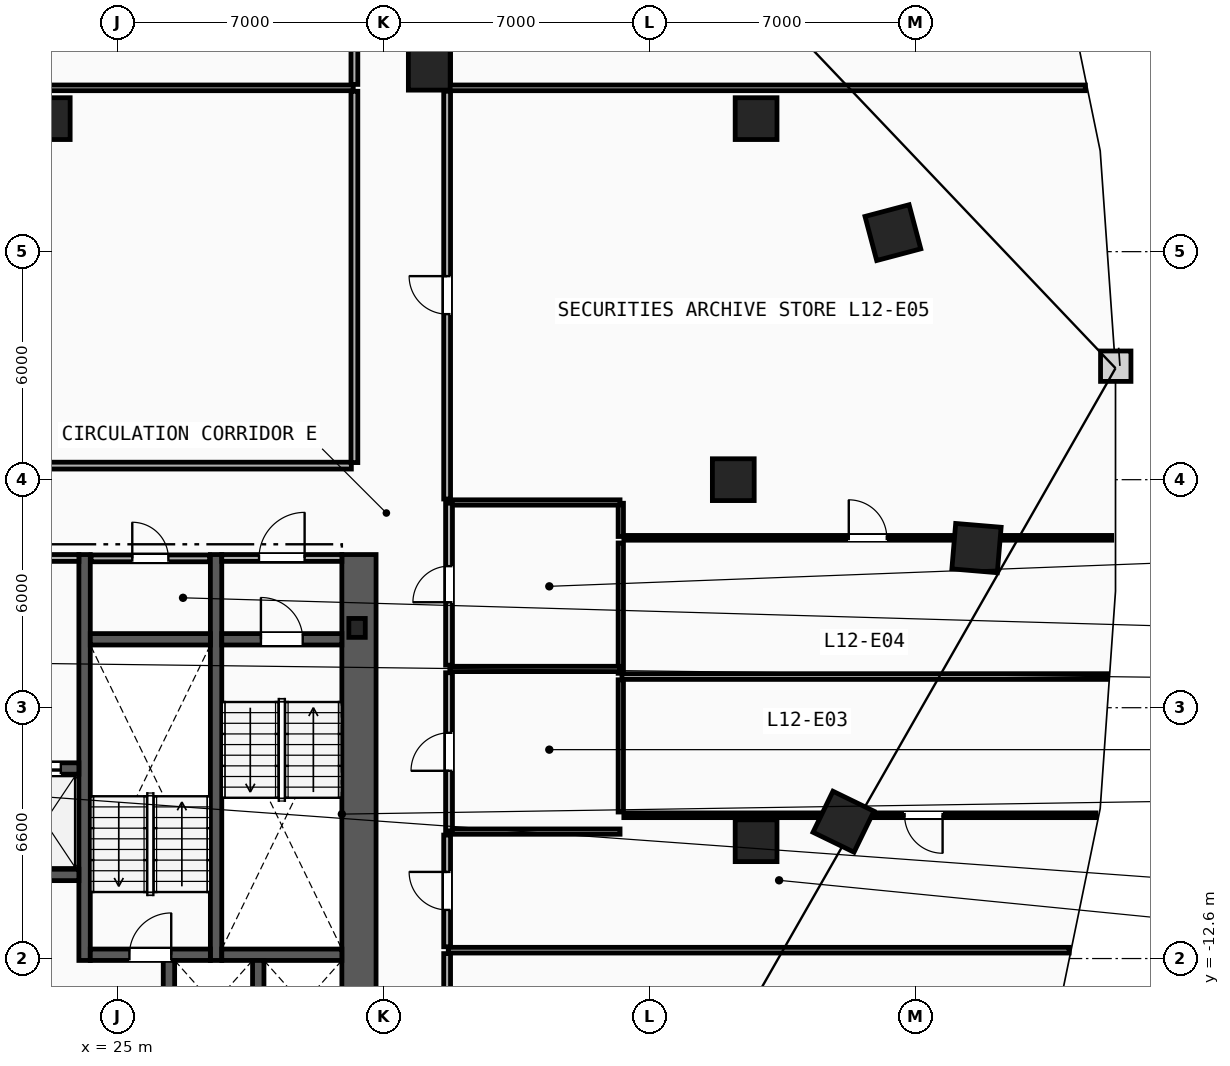
"""IFC4 building model, lengths in metres.
Left out: names, types, materials, properties, quantities, classifications, styles, units other than length and angle.
Written with IfcOpenShell. Run it as: python <this file> out.ifc"""

import sys

from ifc_helpers import new_model, si_unit, direction, frame, frame_2d, origin, origin_2d, place, context, subcontext, project, spatial, rectangle, i_section, extrude, element, fill, save


model = new_model("IFC4")
c1 = context("Model", 3, precision=1e-05, world=origin(), true_north=direction((0.0, 1.0)))
c2 = subcontext(c1, "Body", "Model", "MODEL_VIEW")
j1 = project(units=[si_unit("LENGTHUNIT", "METRE"), si_unit("PLANEANGLEUNIT", "RADIAN")], contexts=[c1])
p1 = place(None, origin())
s1 = spatial("IfcSite", under=j1, at=p1, CompositionType="ELEMENT")
p2 = place(p1, origin())
s2 = spatial("IfcBuilding", under=s1, at=p2, CompositionType="ELEMENT")
p3 = place(p2, frame((0.0, 0.0, 50.6)))
s3 = spatial("IfcBuildingStorey", under=s2, at=p3, CompositionType="ELEMENT", Elevation=50.6)
p4 = place(p3, frame((31.3, -3.9, 0.0), z_axis=(0.0, 0.0, 1.0), x_axis=(1.0, 0.0, 0.0)))
e1 = element("IfcColumn", 1, at=p4, inside=s3, PredefinedType="COLUMN", context=c2, shape_type="SweptSolid", body=[
    extrude(i_section(OverallWidth=0.432, OverallDepth=0.498, WebThickness=0.056, FlangeThickness=0.089, FilletRadius=0.018, at=origin_2d()), origin(), (0.0, 0.0, 1.0), 3.8),
])
for number, where, z_axis, x_axis in (
    (2, (41.2, 0.0, 0.0), (0.0, 0.0, 1.0), (1.0, 0.0, 0.0)),
    (3, (41.8, -9.5, 0.0), (0.0, 0.0, 1.0), (1.0, 0.0, 0.0)),
    (4, (41.8, 9.5, 0.0), (0.0, 0.0, 1.0), (1.0, 0.0, 0.0)),
    (5, (33.2, 10.8, 0.0), (0.0, 0.0, 1.0), (1.0, 0.0, 0.0)),
    (6, (23.2, 9.5, 0.0), (0.0, 0.0, 1.0), (1.0, 0.0, 0.0)),
):
    element("IfcColumn", number, at=place(p3, frame(where, z_axis=z_axis, x_axis=x_axis)), inside=s3, PredefinedType="COLUMN", context=c2, shape_type="SweptSolid", body=[
        extrude(rectangle(XDim=1.1, YDim=1.1, at=origin_2d()), origin(), (0.0, 0.0, 1.0), 3.8),
    ])
for number, where, z_axis, x_axis in (
    (7, (44.1, -9.0, 0.0), (0.0, 0.0, 1.0), (0.437, 0.899, 0.0)),
    (8, (47.6, -1.8, 0.0), (0.0, 0.0, 1.0), (0.084, 0.997, 0.0)),
    (9, (45.4, 6.5, 0.0), (0.0, 0.0, 1.0), (-0.256, 0.967, 0.0)),
):
    element("IfcColumn", number, at=place(p3, frame(where, z_axis=z_axis, x_axis=x_axis)), inside=s3, PredefinedType="COLUMN", context=c2, shape_type="SweptSolid", body=[
        extrude(rectangle(XDim=1.2, YDim=1.2, at=origin_2d()), origin(), (0.0, 0.0, 1.0), 3.8),
    ])
p5 = place(p3, frame((31.35, -15.3, 0.0), z_axis=(0.0, 0.0, 1.0), x_axis=(0.0, 1.0, 0.0)))
e10 = element("IfcWall", 10, at=p5, inside=s3, PredefinedType="SHEAR", context=c2, shape_type="SweptSolid", body=[
    extrude(rectangle(XDim=13.33, YDim=0.9, at=frame_2d((6.665, 0.0))), origin(), (0.0, 0.0, 1.0), 3.5),
])
for number, where, z_axis, x_axis in (
    (11, (27.59, -12.65, 0.0), (0.0, 0.0, 1.0), (0.0, 1.0, 0.0)),
    (12, (24.13, -12.65, 0.0), (0.0, 0.0, 1.0), (0.0, 1.0, 0.0)),
):
    element("IfcWall", number, at=place(p3, frame(where, z_axis=z_axis, x_axis=x_axis)), inside=s3, PredefinedType="SHEAR", context=c2, shape_type="SweptSolid", body=[
        extrude(rectangle(XDim=10.68, YDim=0.3, at=frame_2d((5.34, 0.0))), origin(), (0.0, 0.0, 1.0), 3.5),
    ])
p6 = place(p3, frame((27.74, -4.2, 0.0), z_axis=(0.0, 0.0, 1.0), x_axis=(1.0, 0.0, 0.0)))
e13 = element("IfcWall", 13, at=p6, inside=s3, PredefinedType="SHEAR", context=c2, shape_type="SweptSolid", body=[
    extrude(rectangle(XDim=3.16, YDim=0.3, at=frame_2d((1.58, 0.0))), origin(), (0.0, 0.0, 1.0), 3.5),
])
p7 = place(p6, frame((1.03, 0.0, 0.0)))
e14 = element("IfcOpeningElement", 14, at=p7, cuts=e13, PredefinedType="OPENING", context=c2, shape_type="SweptSolid", body=[
    extrude(rectangle(XDim=1.1, YDim=2.15, at=frame_2d((0.55, 1.075))), frame((0.0, 0.16, 0.0), z_axis=(0.0, -1.0, 0.0), x_axis=(1.0, 0.0, 0.0)), (0.0, 0.0, 1.0), 0.32),
])
p8 = place(p3, frame((27.74, -12.5, 0.0), z_axis=(0.0, 0.0, 1.0), x_axis=(1.0, 0.0, 0.0)))
e15 = element("IfcWall", 15, at=p8, inside=s3, PredefinedType="SHEAR", context=c2, shape_type="SweptSolid", body=[
    extrude(rectangle(XDim=3.16, YDim=0.3, at=frame_2d((1.58, 0.0))), origin(), (0.0, 0.0, 1.0), 3.5),
])
p9 = place(p3, frame((24.28, -12.5, 0.0), z_axis=(0.0, 0.0, 1.0), x_axis=(1.0, 0.0, 0.0)))
e16 = element("IfcWall", 16, at=p9, inside=s3, PredefinedType="SHEAR", context=c2, shape_type="SweptSolid", body=[
    extrude(rectangle(XDim=3.16, YDim=0.3, at=frame_2d((1.58, 0.0))), origin(), (0.0, 0.0, 1.0), 3.5),
])
p10 = place(p9, frame((1.03, 0.0, 0.0)))
e17 = element("IfcOpeningElement", 17, at=p10, cuts=e16, PredefinedType="OPENING", context=c2, shape_type="SweptSolid", body=[
    extrude(rectangle(XDim=1.1, YDim=2.15, at=frame_2d((0.55, 1.075))), frame((0.0, 0.16, 0.0), z_axis=(0.0, -1.0, 0.0), x_axis=(1.0, 0.0, 0.0)), (0.0, 0.0, 1.0), 0.32),
])
p11 = place(p3, frame((24.28, -4.2, 0.0), z_axis=(0.0, 0.0, 1.0), x_axis=(1.0, 0.0, 0.0)))
e18 = element("IfcWall", 18, at=p11, inside=s3, PredefinedType="SHEAR", context=c2, shape_type="SweptSolid", body=[
    extrude(rectangle(XDim=3.16, YDim=0.3, at=frame_2d((1.58, 0.0))), origin(), (0.0, 0.0, 1.0), 3.5),
])
p12 = place(p3, frame((20.98, -2.06, 0.0), z_axis=(0.0, 0.0, 1.0), x_axis=(1.0, 0.0, 0.0)))
e19 = element("IfcWall", 19, at=p12, inside=s3, PredefinedType="PARTITIONING", context=c2, shape_type="SweptSolid", body=[
    extrude(rectangle(XDim=3.0, YDim=0.18, at=frame_2d((1.5, 0.0))), origin(), (0.0, 0.0, 1.0), 3.5),
])
p13 = place(p12, frame((0.9, 0.0, 0.0)))
e20 = element("IfcOpeningElement", 20, at=p13, cuts=e19, PredefinedType="OPENING", context=c2, shape_type="SweptSolid", body=[
    extrude(rectangle(XDim=1.2, YDim=2.15, at=frame_2d((0.6, 1.075))), frame((0.0, 0.1, 0.0), z_axis=(0.0, -1.0, 0.0), x_axis=(1.0, 0.0, 0.0)), (0.0, 0.0, 1.0), 0.2),
])
p14 = place(p3, frame((27.74, -2.06, 0.0), z_axis=(0.0, 0.0, 1.0), x_axis=(1.0, 0.0, 0.0)))
e21 = element("IfcWall", 21, at=p14, inside=s3, PredefinedType="PARTITIONING", context=c2, shape_type="SweptSolid", body=[
    extrude(rectangle(XDim=3.16, YDim=0.18, at=frame_2d((1.58, 0.0))), origin(), (0.0, 0.0, 1.0), 3.5),
])
p15 = place(p14, frame((0.98, 0.0, 0.0)))
e22 = element("IfcOpeningElement", 22, at=p15, cuts=e21, PredefinedType="OPENING", context=c2, shape_type="SweptSolid", body=[
    extrude(rectangle(XDim=1.2, YDim=2.15, at=frame_2d((0.6, 1.075))), frame((0.0, 0.1, 0.0), z_axis=(0.0, -1.0, 0.0), x_axis=(1.0, 0.0, 0.0)), (0.0, 0.0, 1.0), 0.2),
])
p16 = place(p3, frame((21.88, -7.6, 0.0), z_axis=(0.0, 0.0, 1.0), x_axis=(1.0, 0.0, 0.0)))
e23 = element("IfcWall", 23, at=p16, inside=s3, PredefinedType="SHEAR", context=c2, shape_type="SweptSolid", body=[
    extrude(rectangle(XDim=2.1, YDim=0.3, at=frame_2d((1.05, 0.0))), origin(), (0.0, 0.0, 1.0), 3.5),
])
p17 = place(p16, frame((0.475, 0.0, 0.0)))
e24 = element("IfcOpeningElement", 24, at=p17, cuts=e23, PredefinedType="OPENING", context=c2, shape_type="SweptSolid", body=[
    extrude(rectangle(XDim=1.15, YDim=2.2, at=frame_2d((0.575, 1.1))), frame((0.0, 0.16, 0.0), z_axis=(0.0, -1.0, 0.0), x_axis=(1.0, 0.0, 0.0)), (0.0, 0.0, 1.0), 0.32),
])
p18 = place(p3, frame((21.88, -10.4, 0.0), z_axis=(0.0, 0.0, 1.0), x_axis=(1.0, 0.0, 0.0)))
e25 = element("IfcWall", 25, at=p18, inside=s3, PredefinedType="SHEAR", context=c2, shape_type="SweptSolid", body=[
    extrude(rectangle(XDim=2.1, YDim=0.3, at=frame_2d((1.05, 0.0))), origin(), (0.0, 0.0, 1.0), 3.5),
])
for number, where, z_axis, x_axis in (
    (26, (28.7, -14.95, 0.0), (0.0, 0.0, 1.0), (0.0, 1.0, 0.0)),
    (27, (26.35, -14.95, 0.0), (0.0, 0.0, 1.0), (0.0, 1.0, 0.0)),
):
    element("IfcWall", number, at=place(p3, frame(where, z_axis=z_axis, x_axis=x_axis)), inside=s3, PredefinedType="SHEAR", context=c2, shape_type="SweptSolid", body=[
        extrude(rectangle(XDim=2.3, YDim=0.3, at=frame_2d((1.15, 0.0))), origin(), (0.0, 0.0, 1.0), 3.5),
    ])
p19 = place(p3, frame((24.3, -2.07, 0.0), z_axis=(0.0, 0.0, 1.0), x_axis=(1.0, 0.0, 0.0)))
e28 = element("IfcWall", 28, at=p19, inside=s3, PredefinedType="PARTITIONING", context=c2, shape_type="SweptSolid", body=[
    extrude(rectangle(XDim=3.12, YDim=0.18, at=frame_2d((1.56, 0.0))), origin(), (0.0, 0.0, 1.0), 3.5),
])
p20 = place(p19, frame((1.085, 0.0, 0.0)))
e29 = element("IfcOpeningElement", 29, at=p20, cuts=e28, PredefinedType="OPENING", context=c2, shape_type="SweptSolid", body=[
    extrude(rectangle(XDim=0.95, YDim=2.1, at=frame_2d((0.475, 1.05))), frame((0.0, 0.1, 0.0), z_axis=(0.0, -1.0, 0.0), x_axis=(1.0, 0.0, 0.0)), (0.0, 0.0, 1.0), 0.2),
])
p21 = place(p3, frame((38.24, -8.745, 0.0), z_axis=(0.0, 0.0, 1.0), x_axis=(0.0, 1.0, 0.0)))
e30 = element("IfcWall", 30, at=p21, inside=s3, PredefinedType="PARTITIONING", context=c2, shape_type="SweptSolid", body=[
    extrude(rectangle(XDim=3.48, YDim=0.14, at=frame_2d((1.74, 0.0))), origin(), (0.0, 0.0, 1.0), 3.5),
])
p22 = place(p3, frame((38.24, -5.095, 0.0), z_axis=(0.0, 0.0, 1.0), x_axis=(0.0, 1.0, 0.0)))
e31 = element("IfcWall", 31, at=p22, inside=s3, PredefinedType="PARTITIONING", context=c2, shape_type="SweptSolid", body=[
    extrude(rectangle(XDim=3.43, YDim=0.14, at=frame_2d((1.715, 0.0))), origin(), (0.0, 0.0, 1.0), 3.5),
])
p23 = place(p3, frame((38.24, -1.495, 0.0), z_axis=(0.0, 0.0, 1.0), x_axis=(0.0, 1.0, 0.0)))
e32 = element("IfcWall", 32, at=p23, inside=s3, PredefinedType="PARTITIONING", context=c2, shape_type="SweptSolid", body=[
    extrude(rectangle(XDim=0.875, YDim=0.14, at=frame_2d((0.438, 0.0))), origin(), (0.0, 0.0, 1.0), 3.5),
])
for number, where, z_axis, x_axis in (
    (33, (33.74, -0.6, 0.0), (0.0, 0.0, 1.0), (1.0, 0.0, 0.0)),
    (34, (33.74, -4.98, 0.0), (0.0, 0.0, 1.0), (1.0, 0.0, 0.0)),
    (35, (33.74, -9.26, 0.0), (0.0, 0.0, 1.0), (1.0, 0.0, 0.0)),
):
    element("IfcWall", number, at=place(p3, frame(where, z_axis=z_axis, x_axis=x_axis)), inside=s3, PredefinedType="PARTITIONING", context=c2, shape_type="SweptSolid", body=[
        extrude(rectangle(XDim=4.48, YDim=0.14, at=frame_2d((2.24, 0.0))), origin(), (0.0, 0.0, 1.0), 3.5),
    ])
p24 = place(p3, frame((33.72, -4.88, 0.0), z_axis=(0.0, 0.0, 1.0), x_axis=(0.0, 1.0, 0.0)))
e36 = element("IfcWall", 36, at=p24, inside=s3, PredefinedType="PARTITIONING", context=c2, shape_type="SweptSolid", body=[
    extrude(rectangle(XDim=4.26, YDim=0.18, at=frame_2d((2.13, 0.0))), origin(), (0.0, 0.0, 1.0), 3.5),
])
p25 = place(p24, frame((1.655, 0.0, 0.0)))
e37 = element("IfcOpeningElement", 37, at=p25, cuts=e36, PredefinedType="OPENING", context=c2, shape_type="SweptSolid", body=[
    extrude(rectangle(XDim=0.95, YDim=2.1, at=frame_2d((0.475, 1.05))), frame((0.0, 0.1, 0.0), z_axis=(0.0, -1.0, 0.0), x_axis=(1.0, 0.0, 0.0)), (0.0, 0.0, 1.0), 0.2),
])
p26 = place(p3, frame((33.72, -9.24, 0.0), z_axis=(0.0, 0.0, 1.0), x_axis=(0.0, 1.0, 0.0)))
e38 = element("IfcWall", 38, at=p26, inside=s3, PredefinedType="PARTITIONING", context=c2, shape_type="SweptSolid", body=[
    extrude(rectangle(XDim=4.16, YDim=0.18, at=frame_2d((2.08, 0.0))), origin(), (0.0, 0.0, 1.0), 3.5),
])
p27 = place(p26, frame((1.58, 0.0, 0.0)))
e39 = element("IfcOpeningElement", 39, at=p27, cuts=e38, PredefinedType="OPENING", context=c2, shape_type="SweptSolid", body=[
    extrude(rectangle(XDim=1.0, YDim=2.15, at=frame_2d((0.5, 1.075))), frame((0.0, 0.1, 0.0), z_axis=(0.0, -1.0, 0.0), x_axis=(1.0, 0.0, 0.0)), (0.0, 0.0, 1.0), 0.2),
])
p28 = place(p3, frame((13.536, 10.31, 0.0), z_axis=(0.0, 0.0, 1.0), x_axis=(1.0, 0.0, 0.0)))
e40 = element("IfcWall", 40, at=p28, inside=s3, PredefinedType="PARTITIONING", context=c2, shape_type="SweptSolid", body=[
    extrude(rectangle(XDim=17.664, YDim=0.15, at=frame_2d((8.832, 0.0))), origin(), (0.0, 0.0, 1.0), 2.805),
])
p29 = place(p3, frame((33.7, 10.31, 0.0), z_axis=(0.0, 0.0, 1.0), x_axis=(1.0, 0.0, 0.0)))
e41 = element("IfcWall", 41, at=p29, inside=s3, PredefinedType="PARTITIONING", context=c2, shape_type="SweptSolid", body=[
    extrude(rectangle(XDim=16.764, YDim=0.15, at=frame_2d((8.382, 0.0))), origin(), (0.0, 0.0, 1.0), 2.805),
])
p30 = place(p3, frame((38.27, -5.18, 0.0), z_axis=(0.0, 0.0, 1.0), x_axis=(1.0, 0.0, 0.0)))
e42 = element("IfcWall", 42, at=p30, inside=s3, PredefinedType="PARTITIONING", context=c2, shape_type="SweptSolid", body=[
    extrude(rectangle(XDim=12.78, YDim=0.15, at=frame_2d((6.39, 0.0))), origin(), (0.0, 0.0, 1.0), 3.5),
])
p31 = place(p3, frame((33.7, -12.38, 0.0), z_axis=(0.0, 0.0, 1.0), x_axis=(1.0, 0.0, 0.0)))
e43 = element("IfcWall", 43, at=p31, inside=s3, PredefinedType="PARTITIONING", context=c2, shape_type="SweptSolid", body=[
    extrude(rectangle(XDim=16.338, YDim=0.15, at=frame_2d((8.169, 0.0))), origin(), (0.0, 0.0, 1.0), 3.5),
])
p32 = place(p3, frame((33.67, -12.29, 0.0), z_axis=(0.0, 0.0, 1.0), x_axis=(0.0, 1.0, 0.0)))
e44 = element("IfcWall", 44, at=p32, inside=s3, PredefinedType="PARTITIONING", context=c2, shape_type="SweptSolid", body=[
    extrude(rectangle(XDim=2.939, YDim=0.18, at=frame_2d((1.469, 0.0))), origin(), (0.0, 0.0, 1.0), 3.5),
])
p33 = place(p32, frame((0.969, 0.0, 0.0)))
e45 = element("IfcOpeningElement", 45, at=p33, cuts=e44, PredefinedType="OPENING", context=c2, shape_type="SweptSolid", body=[
    extrude(rectangle(XDim=1.0, YDim=2.15, at=frame_2d((0.5, 1.075))), frame((0.0, 0.1, 0.0), z_axis=(0.0, -1.0, 0.0), x_axis=(1.0, 0.0, 0.0)), (0.0, 0.0, 1.0), 0.2),
])
p34 = place(p3, frame((31.15, 0.37, 0.0), z_axis=(0.0, 0.0, 1.0), x_axis=(-1.0, 0.0, 0.0)))
e46 = element("IfcWall", 46, at=p34, inside=s3, PredefinedType="PARTITIONING", context=c2, shape_type="SweptSolid", body=[
    extrude(rectangle(XDim=14.328, YDim=0.18, at=frame_2d((7.164, 0.0))), origin(), (0.0, 0.0, 1.0), 3.5),
])
p35 = place(p3, frame((31.23, 10.22, 0.0), z_axis=(0.0, 0.0, 1.0), x_axis=(0.0, -1.0, 0.0)))
e47 = element("IfcWall", 47, at=p35, inside=s3, PredefinedType="PARTITIONING", context=c2, shape_type="SweptSolid", body=[
    extrude(rectangle(XDim=9.77, YDim=0.18, at=frame_2d((4.885, 0.0))), origin(), (0.0, 0.0, 1.0), 3.5),
])
p36 = place(p3, frame((33.67, -17.428, 0.0), z_axis=(0.0, 0.0, 1.0), x_axis=(0.0, 1.0, 0.0)))
e48 = element("IfcWall", 48, at=p36, inside=s3, PredefinedType="PARTITIONING", context=c2, shape_type="SweptSolid", body=[
    extrude(rectangle(XDim=4.958, YDim=0.18, at=frame_2d((2.479, 0.0))), origin(), (0.0, 0.0, 1.0), 3.5),
])
p37 = place(p3, frame((33.67, -0.509, 0.0), z_axis=(0.0, 0.0, 1.0), x_axis=(0.0, 1.0, 0.0)))
e49 = element("IfcWall", 49, at=p37, inside=s3, PredefinedType="PARTITIONING", context=c2, shape_type="SweptSolid", body=[
    extrude(rectangle(XDim=10.729, YDim=0.18, at=frame_2d((5.364, 0.0))), origin(), (0.0, 0.0, 1.0), 3.5),
])
p38 = place(p37, frame((4.864, 0.0, 0.0)))
e50 = element("IfcOpeningElement", 50, at=p38, cuts=e49, PredefinedType="OPENING", context=c2, shape_type="SweptSolid", body=[
    extrude(rectangle(XDim=1.0, YDim=2.15, at=frame_2d((0.5, 1.075))), frame((0.0, 0.1, 0.0), z_axis=(0.0, -1.0, 0.0), x_axis=(1.0, 0.0, 0.0)), (0.0, 0.0, 1.0), 0.2),
])
for number, where, z_axis, x_axis in (
    (51, (33.67, 10.4, 0.0), (0.0, 0.0, 1.0), (0.0, 1.0, 0.0)),
    (52, (31.23, 11.4, 0.0), (0.0, 0.0, 1.0), (0.0, -1.0, 0.0)),
):
    element("IfcWall", number, at=place(p3, frame(where, z_axis=z_axis, x_axis=x_axis)), inside=s3, PredefinedType="PARTITIONING", context=c2, shape_type="SweptSolid", body=[
        extrude(rectangle(XDim=1.0, YDim=0.18, at=frame_2d((0.5, 0.0))), origin(), (0.0, 0.0, 1.0), 3.5),
    ])
p39 = place(p3, frame((50.742, -8.83, 0.0), z_axis=(0.0, 0.0, 1.0), x_axis=(-1.0, 0.0, 0.0)))
e53 = element("IfcWall", 53, at=p39, inside=s3, PredefinedType="PARTITIONING", context=c2, shape_type="SweptSolid", body=[
    extrude(rectangle(XDim=12.422, YDim=0.125, at=frame_2d((6.211, 0.0))), origin(), (0.0, 0.0, 1.0), 3.5),
])
p40 = place(p39, frame((4.034, 0.0, 0.0)))
e54 = element("IfcOpeningElement", 54, at=p40, cuts=e53, PredefinedType="OPENING", context=c2, shape_type="SweptSolid", body=[
    extrude(rectangle(XDim=1.0, YDim=2.15, at=frame_2d((0.5, 1.075))), frame((0.0, 0.073, 0.0), z_axis=(0.0, -1.0, 0.0), x_axis=(1.0, 0.0, 0.0)), (0.0, 0.0, 1.0), 0.145),
])
p41 = place(p3, frame((38.32, -1.53, 0.0), z_axis=(0.0, 0.0, 1.0), x_axis=(1.0, 0.0, 0.0)))
e55 = element("IfcWall", 55, at=p41, inside=s3, PredefinedType="PARTITIONING", context=c2, shape_type="SweptSolid", body=[
    extrude(rectangle(XDim=12.838, YDim=0.125, at=frame_2d((6.419, 0.0))), origin(), (0.0, 0.0, 1.0), 2.967),
])
p42 = place(p41, frame((5.919, 0.0, 0.0)))
e56 = element("IfcOpeningElement", 56, at=p42, cuts=e55, PredefinedType="OPENING", context=c2, shape_type="SweptSolid", body=[
    extrude(rectangle(XDim=1.0, YDim=2.15, at=frame_2d((0.5, 1.075))), frame((0.0, 0.073, 0.0), z_axis=(0.0, -1.0, 0.0), x_axis=(1.0, 0.0, 0.0)), (0.0, 0.0, 1.0), 0.145),
])
p43 = place(p7, origin())
e57 = element("IfcDoor", 57, at=p43, inside=s3, OperationType="SINGLE_SWING_LEFT", PredefinedType="DOOR", context=c2, shape_type="SweptSolid", body=[
    extrude(rectangle(XDim=1.1, YDim=2.15, at=frame_2d((0.55, 1.075))), frame((0.0, 0.025, 0.0), z_axis=(0.0, -1.0, 0.0), x_axis=(1.0, 0.0, 0.0)), (0.0, 0.0, 1.0), 0.05),
])
fill(e14, e57)
p44 = place(p10, origin())
e58 = element("IfcDoor", 58, at=p44, inside=s3, OperationType="SINGLE_SWING_RIGHT", PredefinedType="DOOR", context=c2, shape_type="SweptSolid", body=[
    extrude(rectangle(XDim=1.1, YDim=2.15, at=frame_2d((0.55, 1.075))), frame((0.0, 0.025, 0.0), z_axis=(0.0, -1.0, 0.0), x_axis=(1.0, 0.0, 0.0)), (0.0, 0.0, 1.0), 0.05),
])
fill(e17, e58)
p45 = place(p15, origin())
e59 = element("IfcDoor", 59, at=p45, inside=s3, OperationType="SINGLE_SWING_RIGHT", PredefinedType="DOOR", context=c2, shape_type="SweptSolid", body=[
    extrude(rectangle(XDim=1.2, YDim=2.15, at=frame_2d((0.6, 1.075))), frame((0.0, 0.025, 0.0), z_axis=(0.0, -1.0, 0.0), x_axis=(1.0, 0.0, 0.0)), (0.0, 0.0, 1.0), 0.05),
])
fill(e22, e59)
p46 = place(p17, origin())
e60 = element("IfcDoor", 60, at=p46, inside=s3, OperationType="SLIDING_TO_LEFT", PredefinedType="TRAPDOOR", context=c2, shape_type="SweptSolid", body=[
    extrude(rectangle(XDim=1.15, YDim=2.2, at=frame_2d((0.575, 1.1))), frame((0.0, 0.025, 0.0), z_axis=(0.0, -1.0, 0.0), x_axis=(1.0, 0.0, 0.0)), (0.0, 0.0, 1.0), 0.05),
])
fill(e24, e60)
p47 = place(p42, origin())
e61 = element("IfcDoor", 61, at=p47, inside=s3, OperationType="SINGLE_SWING_LEFT", PredefinedType="DOOR", context=c2, shape_type="SweptSolid", body=[
    extrude(rectangle(XDim=1.0, YDim=2.15, at=frame_2d((0.5, 1.075))), frame((0.0, 0.025, 0.0), z_axis=(0.0, -1.0, 0.0), x_axis=(1.0, 0.0, 0.0)), (0.0, 0.0, 1.0), 0.05),
])
fill(e56, e61)
p48 = place(p40, origin())
e62 = element("IfcDoor", 62, at=p48, inside=s3, OperationType="SINGLE_SWING_LEFT", PredefinedType="DOOR", context=c2, shape_type="SweptSolid", body=[
    extrude(rectangle(XDim=1.0, YDim=2.15, at=frame_2d((0.5, 1.075))), frame((0.0, 0.025, 0.0), z_axis=(0.0, -1.0, 0.0), x_axis=(1.0, 0.0, 0.0)), (0.0, 0.0, 1.0), 0.05),
])
fill(e54, e62)
p49 = place(p38, origin())
e63 = element("IfcDoor", 63, at=p49, inside=s3, OperationType="SINGLE_SWING_RIGHT", PredefinedType="DOOR", context=c2, shape_type="SweptSolid", body=[
    extrude(rectangle(XDim=1.0, YDim=2.15, at=frame_2d((0.5, 1.075))), frame((0.0, 0.025, 0.0), z_axis=(0.0, -1.0, 0.0), x_axis=(1.0, 0.0, 0.0)), (0.0, 0.0, 1.0), 0.05),
])
fill(e50, e63)
p50 = place(p25, origin())
e64 = element("IfcDoor", 64, at=p50, inside=s3, OperationType="SINGLE_SWING_LEFT", PredefinedType="DOOR", context=c2, shape_type="SweptSolid", body=[
    extrude(rectangle(XDim=0.95, YDim=2.1, at=frame_2d((0.475, 1.05))), frame((0.0, 0.025, 0.0), z_axis=(0.0, -1.0, 0.0), x_axis=(1.0, 0.0, 0.0)), (0.0, 0.0, 1.0), 0.05),
])
fill(e37, e64)
p51 = place(p27, origin())
e65 = element("IfcDoor", 65, at=p51, inside=s3, OperationType="SINGLE_SWING_LEFT", PredefinedType="DOOR", context=c2, shape_type="SweptSolid", body=[
    extrude(rectangle(XDim=1.0, YDim=2.15, at=frame_2d((0.5, 1.075))), frame((0.0, 0.025, 0.0), z_axis=(0.0, -1.0, 0.0), x_axis=(1.0, 0.0, 0.0)), (0.0, 0.0, 1.0), 0.05),
])
fill(e39, e65)
p52 = place(p20, origin())
e66 = element("IfcDoor", 66, at=p52, inside=s3, OperationType="SINGLE_SWING_LEFT", PredefinedType="DOOR", context=c2, shape_type="SweptSolid", body=[
    extrude(rectangle(XDim=0.95, YDim=2.1, at=frame_2d((0.475, 1.05))), frame((0.0, 0.025, 0.0), z_axis=(0.0, -1.0, 0.0), x_axis=(1.0, 0.0, 0.0)), (0.0, 0.0, 1.0), 0.05),
])
fill(e29, e66)
p53 = place(p33, origin())
e67 = element("IfcDoor", 67, at=p53, inside=s3, OperationType="SINGLE_SWING_RIGHT", PredefinedType="DOOR", context=c2, shape_type="SweptSolid", body=[
    extrude(rectangle(XDim=1.0, YDim=2.15, at=frame_2d((0.5, 1.075))), frame((0.0, 0.025, 0.0), z_axis=(0.0, -1.0, 0.0), x_axis=(1.0, 0.0, 0.0)), (0.0, 0.0, 1.0), 0.05),
])
fill(e45, e67)
save(model, sys.argv[1])
